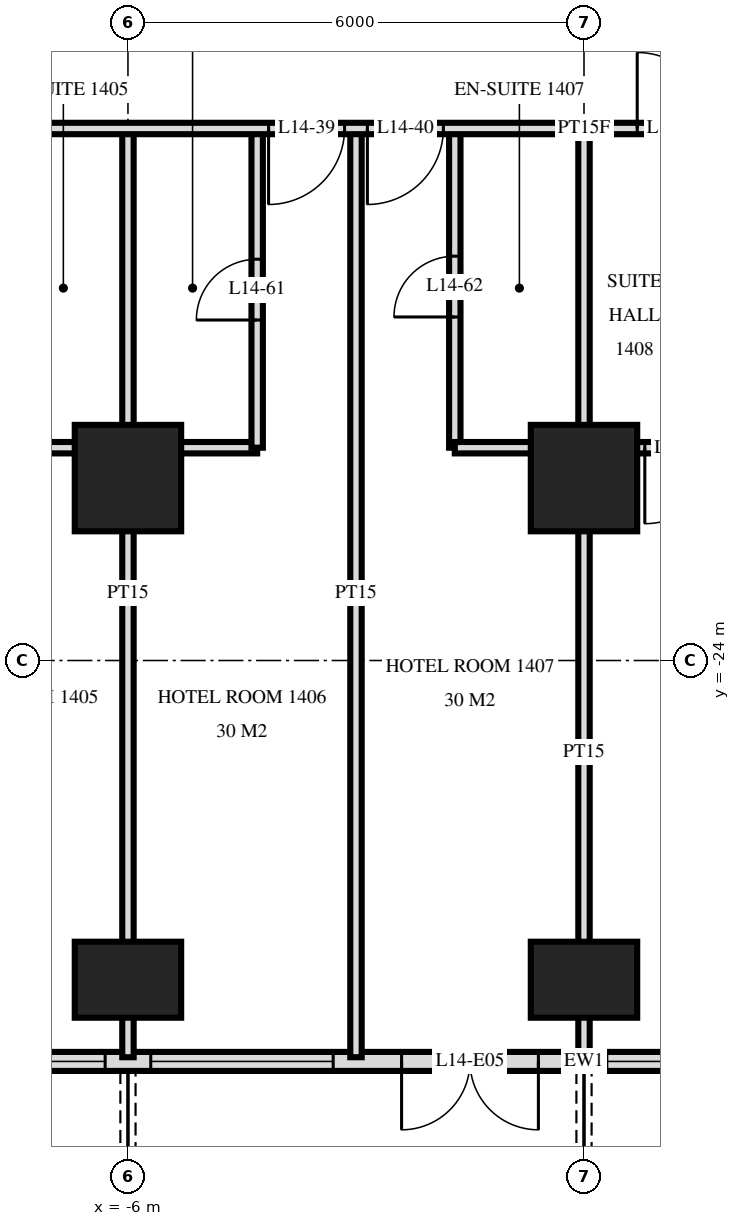
"""IFC4 building model, lengths in metres.
Left out: names, types, materials, properties, quantities, classifications, styles, units other than length and angle.
Written with IfcOpenShell. Run it as: python <this file> out.ifc"""

import sys

from ifc_helpers import new_model, si_unit, direction, frame, frame_2d, origin, origin_2d, place, context, subcontext, project, spatial, rectangle, extrude, element, fill, save


model = new_model("IFC4")
c1 = context("Model", 3, precision=1e-05, world=origin(), true_north=direction((0.0, 1.0)))
c2 = subcontext(c1, "Body", "Model", "MODEL_VIEW")
j1 = project(units=[si_unit("LENGTHUNIT", "METRE"), si_unit("PLANEANGLEUNIT", "RADIAN")], contexts=[c1])
p1 = place(None, origin())
s1 = spatial("IfcSite", under=j1, at=p1, CompositionType="ELEMENT")
p2 = place(p1, origin())
s2 = spatial("IfcBuilding", under=s1, at=p2, CompositionType="ELEMENT")
p3 = place(p2, frame((0.0, 0.0, 60.0)))
s3 = spatial("IfcBuildingStorey", under=s2, at=p3, CompositionType="ELEMENT", Elevation=60.0)
p4 = place(p3, frame((-6.0, -28.2, 0.0), z_axis=(0.0, 0.0, 1.0), x_axis=(1.0, 0.0, 0.0)))
e1 = element("IfcColumn", 1, at=p4, inside=s3, PredefinedType="COLUMN", context=c2, shape_type="SweptSolid", body=[
    extrude(rectangle(XDim=1.4, YDim=1.0, at=origin_2d()), origin(), (0.0, 0.0, 1.0), 3.6),
])
p5 = place(p3, frame((-6.0, -21.6, 0.0), z_axis=(0.0, 0.0, 1.0), x_axis=(1.0, 0.0, 0.0)))
e2 = element("IfcColumn", 2, at=p5, inside=s3, PredefinedType="COLUMN", context=c2, shape_type="SweptSolid", body=[
    extrude(rectangle(XDim=1.4, YDim=1.4, at=origin_2d()), origin(), (0.0, 0.0, 1.0), 3.6),
])
p6 = place(p3, frame((0.0, -28.2, 0.0), z_axis=(0.0, 0.0, 1.0), x_axis=(1.0, 0.0, 0.0)))
e3 = element("IfcColumn", 3, at=p6, inside=s3, PredefinedType="COLUMN", context=c2, shape_type="SweptSolid", body=[
    extrude(rectangle(XDim=1.4, YDim=1.0, at=origin_2d()), origin(), (0.0, 0.0, 1.0), 3.6),
])
p7 = place(p3, frame((0.0, -21.6, 0.0), z_axis=(0.0, 0.0, 1.0), x_axis=(1.0, 0.0, 0.0)))
e4 = element("IfcColumn", 4, at=p7, inside=s3, PredefinedType="COLUMN", context=c2, shape_type="SweptSolid", body=[
    extrude(rectangle(XDim=1.4, YDim=1.4, at=origin_2d()), origin(), (0.0, 0.0, 1.0), 3.6),
])
p8 = place(p3, frame((-28.775, -29.275, 0.0), z_axis=(0.0, 0.0, 1.0), x_axis=(1.0, 0.0, 0.0)))
e5 = element("IfcWall", 5, at=p8, inside=s3, PredefinedType="SOLIDWALL", context=c2, shape_type="SweptSolid", body=[
    extrude(rectangle(XDim=57.551, YDim=0.25, at=frame_2d((28.775, 0.0))), origin(), (0.0, 0.0, 1.0), 3.32),
])
p9 = place(p8, frame((0.575, 0.0, 0.0)))
e6 = element("IfcOpeningElement", 6, at=p9, cuts=e5, PredefinedType="OPENING", context=c2, shape_type="SweptSolid", body=[
    extrude(rectangle(XDim=1.8, YDim=2.4, at=frame_2d((0.9, 1.2))), frame((0.0, 0.135, 0.0), z_axis=(0.0, -1.0, 0.0), x_axis=(1.0, 0.0, 0.0)), (0.0, 0.0, 1.0), 0.27),
])
p10 = place(p8, frame((5.375, 0.0, 0.0)))
e7 = element("IfcOpeningElement", 7, at=p10, cuts=e5, PredefinedType="OPENING", context=c2, shape_type="SweptSolid", body=[
    extrude(rectangle(XDim=1.8, YDim=2.4, at=frame_2d((0.9, 1.2))), frame((0.0, 0.135, 0.0), z_axis=(0.0, -1.0, 0.0), x_axis=(1.0, 0.0, 0.0)), (0.0, 0.0, 1.0), 0.27),
])
p11 = place(p8, frame((8.075, 0.0, 0.3)))
e8 = element("IfcOpeningElement", 8, at=p11, cuts=e5, PredefinedType="OPENING", context=c2, shape_type="SweptSolid", body=[
    extrude(rectangle(XDim=2.4, YDim=2.1, at=frame_2d((1.2, 1.05))), frame((0.0, 0.135, 0.0), z_axis=(0.0, -1.0, 0.0), x_axis=(1.0, 0.0, 0.0)), (0.0, 0.0, 1.0), 0.27),
])
p12 = place(p8, frame((11.375, 0.0, 0.0)))
e9 = element("IfcOpeningElement", 9, at=p12, cuts=e5, PredefinedType="OPENING", context=c2, shape_type="SweptSolid", body=[
    extrude(rectangle(XDim=1.8, YDim=2.4, at=frame_2d((0.9, 1.2))), frame((0.0, 0.135, 0.0), z_axis=(0.0, -1.0, 0.0), x_axis=(1.0, 0.0, 0.0)), (0.0, 0.0, 1.0), 0.27),
])
p13 = place(p8, frame((14.075, 0.0, 0.3)))
e10 = element("IfcOpeningElement", 10, at=p13, cuts=e5, PredefinedType="OPENING", context=c2, shape_type="SweptSolid", body=[
    extrude(rectangle(XDim=2.4, YDim=2.1, at=frame_2d((1.2, 1.05))), frame((0.0, 0.135, 0.0), z_axis=(0.0, -1.0, 0.0), x_axis=(1.0, 0.0, 0.0)), (0.0, 0.0, 1.0), 0.27),
])
p14 = place(p8, frame((17.375, 0.0, 0.0)))
e11 = element("IfcOpeningElement", 11, at=p14, cuts=e5, PredefinedType="OPENING", context=c2, shape_type="SweptSolid", body=[
    extrude(rectangle(XDim=1.8, YDim=2.4, at=frame_2d((0.9, 1.2))), frame((0.0, 0.135, 0.0), z_axis=(0.0, -1.0, 0.0), x_axis=(1.0, 0.0, 0.0)), (0.0, 0.0, 1.0), 0.27),
])
p15 = place(p8, frame((20.075, 0.0, 0.3)))
e12 = element("IfcOpeningElement", 12, at=p15, cuts=e5, PredefinedType="OPENING", context=c2, shape_type="SweptSolid", body=[
    extrude(rectangle(XDim=2.4, YDim=2.1, at=frame_2d((1.2, 1.05))), frame((0.0, 0.135, 0.0), z_axis=(0.0, -1.0, 0.0), x_axis=(1.0, 0.0, 0.0)), (0.0, 0.0, 1.0), 0.27),
])
p16 = place(p8, frame((23.075, 0.0, 0.3)))
e13 = element("IfcOpeningElement", 13, at=p16, cuts=e5, PredefinedType="OPENING", context=c2, shape_type="SweptSolid", body=[
    extrude(rectangle(XDim=2.4, YDim=2.1, at=frame_2d((1.2, 1.05))), frame((0.0, 0.135, 0.0), z_axis=(0.0, -1.0, 0.0), x_axis=(1.0, 0.0, 0.0)), (0.0, 0.0, 1.0), 0.27),
])
p17 = place(p8, frame((26.375, 0.0, 0.0)))
e14 = element("IfcOpeningElement", 14, at=p17, cuts=e5, PredefinedType="OPENING", context=c2, shape_type="SweptSolid", body=[
    extrude(rectangle(XDim=1.8, YDim=2.4, at=frame_2d((0.9, 1.2))), frame((0.0, 0.135, 0.0), z_axis=(0.0, -1.0, 0.0), x_axis=(1.0, 0.0, 0.0)), (0.0, 0.0, 1.0), 0.27),
])
p18 = place(p8, frame((29.075, 0.0, 0.3)))
e15 = element("IfcOpeningElement", 15, at=p18, cuts=e5, PredefinedType="OPENING", context=c2, shape_type="SweptSolid", body=[
    extrude(rectangle(XDim=2.4, YDim=2.1, at=frame_2d((1.2, 1.05))), frame((0.0, 0.135, 0.0), z_axis=(0.0, -1.0, 0.0), x_axis=(1.0, 0.0, 0.0)), (0.0, 0.0, 1.0), 0.27),
])
p19 = place(p8, frame((32.375, 0.0, 0.0)))
e16 = element("IfcOpeningElement", 16, at=p19, cuts=e5, PredefinedType="OPENING", context=c2, shape_type="SweptSolid", body=[
    extrude(rectangle(XDim=1.8, YDim=2.4, at=frame_2d((0.9, 1.2))), frame((0.0, 0.135, 0.0), z_axis=(0.0, -1.0, 0.0), x_axis=(1.0, 0.0, 0.0)), (0.0, 0.0, 1.0), 0.27),
])
p20 = place(p8, frame((35.375, 0.0, 0.0)))
e17 = element("IfcOpeningElement", 17, at=p20, cuts=e5, PredefinedType="OPENING", context=c2, shape_type="SweptSolid", body=[
    extrude(rectangle(XDim=1.8, YDim=2.4, at=frame_2d((0.9, 1.2))), frame((0.0, 0.135, 0.0), z_axis=(0.0, -1.0, 0.0), x_axis=(1.0, 0.0, 0.0)), (0.0, 0.0, 1.0), 0.27),
])
p21 = place(p8, frame((38.075, 0.0, 0.3)))
e18 = element("IfcOpeningElement", 18, at=p21, cuts=e5, PredefinedType="OPENING", context=c2, shape_type="SweptSolid", body=[
    extrude(rectangle(XDim=2.4, YDim=2.1, at=frame_2d((1.2, 1.05))), frame((0.0, 0.135, 0.0), z_axis=(0.0, -1.0, 0.0), x_axis=(1.0, 0.0, 0.0)), (0.0, 0.0, 1.0), 0.27),
])
p22 = place(p8, frame((41.375, 0.0, 0.0)))
e19 = element("IfcOpeningElement", 19, at=p22, cuts=e5, PredefinedType="OPENING", context=c2, shape_type="SweptSolid", body=[
    extrude(rectangle(XDim=1.8, YDim=2.4, at=frame_2d((0.9, 1.2))), frame((0.0, 0.135, 0.0), z_axis=(0.0, -1.0, 0.0), x_axis=(1.0, 0.0, 0.0)), (0.0, 0.0, 1.0), 0.27),
])
p23 = place(p8, frame((44.075, 0.0, 0.3)))
e20 = element("IfcOpeningElement", 20, at=p23, cuts=e5, PredefinedType="OPENING", context=c2, shape_type="SweptSolid", body=[
    extrude(rectangle(XDim=2.4, YDim=2.1, at=frame_2d((1.2, 1.05))), frame((0.0, 0.135, 0.0), z_axis=(0.0, -1.0, 0.0), x_axis=(1.0, 0.0, 0.0)), (0.0, 0.0, 1.0), 0.27),
])
p24 = place(p8, frame((47.075, 0.0, 0.3)))
e21 = element("IfcOpeningElement", 21, at=p24, cuts=e5, PredefinedType="OPENING", context=c2, shape_type="SweptSolid", body=[
    extrude(rectangle(XDim=2.4, YDim=2.1, at=frame_2d((1.2, 1.05))), frame((0.0, 0.135, 0.0), z_axis=(0.0, -1.0, 0.0), x_axis=(1.0, 0.0, 0.0)), (0.0, 0.0, 1.0), 0.27),
])
p25 = place(p8, frame((50.375, 0.0, 0.0)))
e22 = element("IfcOpeningElement", 22, at=p25, cuts=e5, PredefinedType="OPENING", context=c2, shape_type="SweptSolid", body=[
    extrude(rectangle(XDim=1.8, YDim=2.4, at=frame_2d((0.9, 1.2))), frame((0.0, 0.135, 0.0), z_axis=(0.0, -1.0, 0.0), x_axis=(1.0, 0.0, 0.0)), (0.0, 0.0, 1.0), 0.27),
])
p26 = place(p8, frame((53.375, 0.0, 0.0)))
e23 = element("IfcOpeningElement", 23, at=p26, cuts=e5, PredefinedType="OPENING", context=c2, shape_type="SweptSolid", body=[
    extrude(rectangle(XDim=1.8, YDim=2.4, at=frame_2d((0.9, 1.2))), frame((0.0, 0.135, 0.0), z_axis=(0.0, -1.0, 0.0), x_axis=(1.0, 0.0, 0.0)), (0.0, 0.0, 1.0), 0.27),
])
p27 = place(p3, frame((0.0, -21.2, 0.0), z_axis=(0.0, 0.0, 1.0), x_axis=(0.0, 1.0, 0.0)))
e24 = element("IfcWall", 24, at=p27, inside=s3, PredefinedType="PARTITIONING", context=c2, shape_type="SweptSolid", body=[
    extrude(rectangle(XDim=4.2, YDim=0.15, at=frame_2d((2.1, 0.0))), origin(), (0.0, 0.0, 1.0), 3.32),
])
p28 = place(p3, frame((0.0, -29.22, 0.0), z_axis=(0.0, 0.0, 1.0), x_axis=(0.0, 1.0, 0.0)))
e25 = element("IfcWall", 25, at=p28, inside=s3, PredefinedType="PARTITIONING", context=c2, shape_type="SweptSolid", body=[
    extrude(rectangle(XDim=8.02, YDim=0.15, at=frame_2d((4.01, 0.0))), origin(), (0.0, 0.0, 1.0), 3.32),
])
p29 = place(p3, frame((-1.7, -21.2, 0.0), z_axis=(0.0, 0.0, 1.0), x_axis=(0.0, 1.0, 0.0)))
e26 = element("IfcWall", 26, at=p29, inside=s3, PredefinedType="PARTITIONING", context=c2, shape_type="SweptSolid", body=[
    extrude(rectangle(XDim=4.2, YDim=0.15, at=frame_2d((2.1, 0.0))), origin(), (0.0, 0.0, 1.0), 3.32),
])
p30 = place(p29, frame((1.72, 0.0, 0.0)))
e27 = element("IfcOpeningElement", 27, at=p30, cuts=e26, PredefinedType="OPENING", context=c2, shape_type="SweptSolid", body=[
    extrude(rectangle(XDim=0.8, YDim=2.1, at=frame_2d((0.4, 1.05))), frame((0.0, 0.085, 0.0), z_axis=(0.0, -1.0, 0.0), x_axis=(1.0, 0.0, 0.0)), (0.0, 0.0, 1.0), 0.17),
])
p31 = place(p3, frame((-3.0, -29.22, 0.0), z_axis=(0.0, 0.0, 1.0), x_axis=(0.0, 1.0, 0.0)))
e28 = element("IfcWall", 28, at=p31, inside=s3, PredefinedType="PARTITIONING", context=c2, shape_type="SweptSolid", body=[
    extrude(rectangle(XDim=12.22, YDim=0.15, at=frame_2d((6.11, 0.0))), origin(), (0.0, 0.0, 1.0), 3.32),
])
p32 = place(p3, frame((-4.3, -21.2, 0.0), z_axis=(0.0, 0.0, 1.0), x_axis=(0.0, 1.0, 0.0)))
e29 = element("IfcWall", 29, at=p32, inside=s3, PredefinedType="PARTITIONING", context=c2, shape_type="SweptSolid", body=[
    extrude(rectangle(XDim=4.2, YDim=0.15, at=frame_2d((2.1, 0.0))), origin(), (0.0, 0.0, 1.0), 3.32),
])
p33 = place(p32, frame((1.68, 0.0, 0.0)))
e30 = element("IfcOpeningElement", 30, at=p33, cuts=e29, PredefinedType="OPENING", context=c2, shape_type="SweptSolid", body=[
    extrude(rectangle(XDim=0.8, YDim=2.1, at=frame_2d((0.4, 1.05))), frame((0.0, 0.085, 0.0), z_axis=(0.0, -1.0, 0.0), x_axis=(1.0, 0.0, 0.0)), (0.0, 0.0, 1.0), 0.17),
])
p34 = place(p3, frame((-6.0, -29.22, 0.0), z_axis=(0.0, 0.0, 1.0), x_axis=(0.0, 1.0, 0.0)))
e31 = element("IfcWall", 31, at=p34, inside=s3, PredefinedType="PARTITIONING", context=c2, shape_type="SweptSolid", body=[
    extrude(rectangle(XDim=12.22, YDim=0.15, at=frame_2d((6.11, 0.0))), origin(), (0.0, 0.0, 1.0), 3.32),
])
p35 = place(p3, frame((0.0, -21.2, 0.0), z_axis=(0.0, 0.0, 1.0), x_axis=(1.0, 0.0, 0.0)))
e32 = element("IfcWall", 32, at=p35, inside=s3, PredefinedType="PARTITIONING", context=c2, shape_type="SweptSolid", body=[
    extrude(rectangle(XDim=2.4, YDim=0.15, at=frame_2d((1.2, 0.0))), origin(), (0.0, 0.0, 1.0), 3.32),
])
p36 = place(p35, frame((0.8, 0.0, 0.0)))
e33 = element("IfcOpeningElement", 33, at=p36, cuts=e32, PredefinedType="OPENING", context=c2, shape_type="SweptSolid", body=[
    extrude(rectangle(XDim=1.0, YDim=2.1, at=frame_2d((0.5, 1.05))), frame((0.0, 0.085, 0.0), z_axis=(0.0, -1.0, 0.0), x_axis=(1.0, 0.0, 0.0)), (0.0, 0.0, 1.0), 0.17),
])
p37 = place(p3, frame((-7.7, -21.2, 0.0), z_axis=(0.0, 0.0, 1.0), x_axis=(1.0, 0.0, 0.0)))
e34 = element("IfcWall", 34, at=p37, inside=s3, PredefinedType="PARTITIONING", context=c2, shape_type="SweptSolid", body=[
    extrude(rectangle(XDim=3.4, YDim=0.15, at=frame_2d((1.7, 0.0))), origin(), (0.0, 0.0, 1.0), 3.32),
])
p38 = place(p3, frame((-1.7, -21.2, 0.0), z_axis=(0.0, 0.0, 1.0), x_axis=(1.0, 0.0, 0.0)))
e35 = element("IfcWall", 35, at=p38, inside=s3, PredefinedType="PARTITIONING", context=c2, shape_type="SweptSolid", body=[
    extrude(rectangle(XDim=1.7, YDim=0.15, at=frame_2d((0.85, 0.0))), origin(), (0.0, 0.0, 1.0), 3.32),
])
p39 = place(p3, frame((-33.12, -17.0, 0.0), z_axis=(0.0, 0.0, 1.0), x_axis=(1.0, 0.0, 0.0)))
e36 = element("IfcWall", 36, at=p39, inside=s3, PredefinedType="PARTITIONING", context=c2, shape_type="SweptSolid", body=[
    extrude(rectangle(XDim=66.24, YDim=0.15, at=frame_2d((33.12, 0.0))), origin(), (0.0, 0.0, 1.0), 3.32),
])
p40 = place(p39, frame((12.27, 0.0, 0.0)))
e37 = element("IfcOpeningElement", 37, at=p40, cuts=e36, PredefinedType="OPENING", context=c2, shape_type="SweptSolid", body=[
    extrude(rectangle(XDim=1.0, YDim=2.1, at=frame_2d((0.5, 1.05))), frame((0.0, 0.085, 0.0), z_axis=(0.0, -1.0, 0.0), x_axis=(1.0, 0.0, 0.0)), (0.0, 0.0, 1.0), 0.17),
])
p41 = place(p39, frame((16.97, 0.0, 0.0)))
e38 = element("IfcOpeningElement", 38, at=p41, cuts=e36, PredefinedType="OPENING", context=c2, shape_type="SweptSolid", body=[
    extrude(rectangle(XDim=1.0, YDim=2.1, at=frame_2d((0.5, 1.05))), frame((0.0, 0.085, 0.0), z_axis=(0.0, -1.0, 0.0), x_axis=(1.0, 0.0, 0.0)), (0.0, 0.0, 1.0), 0.17),
])
p42 = place(p39, frame((18.27, 0.0, 0.0)))
e39 = element("IfcOpeningElement", 39, at=p42, cuts=e36, PredefinedType="OPENING", context=c2, shape_type="SweptSolid", body=[
    extrude(rectangle(XDim=1.0, YDim=2.1, at=frame_2d((0.5, 1.05))), frame((0.0, 0.085, 0.0), z_axis=(0.0, -1.0, 0.0), x_axis=(1.0, 0.0, 0.0)), (0.0, 0.0, 1.0), 0.17),
])
p43 = place(p39, frame((22.97, 0.0, 0.0)))
e40 = element("IfcOpeningElement", 40, at=p43, cuts=e36, PredefinedType="OPENING", context=c2, shape_type="SweptSolid", body=[
    extrude(rectangle(XDim=1.0, YDim=2.1, at=frame_2d((0.5, 1.05))), frame((0.0, 0.085, 0.0), z_axis=(0.0, -1.0, 0.0), x_axis=(1.0, 0.0, 0.0)), (0.0, 0.0, 1.0), 0.17),
])
p44 = place(p39, frame((24.27, 0.0, 0.0)))
e41 = element("IfcOpeningElement", 41, at=p44, cuts=e36, PredefinedType="OPENING", context=c2, shape_type="SweptSolid", body=[
    extrude(rectangle(XDim=1.0, YDim=2.1, at=frame_2d((0.5, 1.05))), frame((0.0, 0.085, 0.0), z_axis=(0.0, -1.0, 0.0), x_axis=(1.0, 0.0, 0.0)), (0.0, 0.0, 1.0), 0.17),
])
p45 = place(p39, frame((28.97, 0.0, 0.0)))
e42 = element("IfcOpeningElement", 42, at=p45, cuts=e36, PredefinedType="OPENING", context=c2, shape_type="SweptSolid", body=[
    extrude(rectangle(XDim=1.0, YDim=2.1, at=frame_2d((0.5, 1.05))), frame((0.0, 0.085, 0.0), z_axis=(0.0, -1.0, 0.0), x_axis=(1.0, 0.0, 0.0)), (0.0, 0.0, 1.0), 0.17),
])
p46 = place(p39, frame((30.27, 0.0, 0.0)))
e43 = element("IfcOpeningElement", 43, at=p46, cuts=e36, PredefinedType="OPENING", context=c2, shape_type="SweptSolid", body=[
    extrude(rectangle(XDim=1.0, YDim=2.1, at=frame_2d((0.5, 1.05))), frame((0.0, 0.085, 0.0), z_axis=(0.0, -1.0, 0.0), x_axis=(1.0, 0.0, 0.0)), (0.0, 0.0, 1.0), 0.17),
])
p47 = place(p39, frame((33.82, 0.0, 0.0)))
e44 = element("IfcOpeningElement", 44, at=p47, cuts=e36, PredefinedType="OPENING", context=c2, shape_type="SweptSolid", body=[
    extrude(rectangle(XDim=1.0, YDim=2.1, at=frame_2d((0.5, 1.05))), frame((0.0, 0.085, 0.0), z_axis=(0.0, -1.0, 0.0), x_axis=(1.0, 0.0, 0.0)), (0.0, 0.0, 1.0), 0.17),
])
p48 = place(p39, frame((46.27, 0.0, 0.0)))
e45 = element("IfcOpeningElement", 45, at=p48, cuts=e36, PredefinedType="OPENING", context=c2, shape_type="SweptSolid", body=[
    extrude(rectangle(XDim=1.0, YDim=2.1, at=frame_2d((0.5, 1.05))), frame((0.0, 0.085, 0.0), z_axis=(0.0, -1.0, 0.0), x_axis=(1.0, 0.0, 0.0)), (0.0, 0.0, 1.0), 0.17),
])
p49 = place(p39, frame((52.97, 0.0, 0.0)))
e46 = element("IfcOpeningElement", 46, at=p49, cuts=e36, PredefinedType="OPENING", context=c2, shape_type="SweptSolid", body=[
    extrude(rectangle(XDim=1.0, YDim=2.1, at=frame_2d((0.5, 1.05))), frame((0.0, 0.085, 0.0), z_axis=(0.0, -1.0, 0.0), x_axis=(1.0, 0.0, 0.0)), (0.0, 0.0, 1.0), 0.17),
])
p50 = place(p39, frame((6.05, 0.0, 0.0)))
e47 = element("IfcOpeningElement", 47, at=p50, cuts=e36, PredefinedType="OPENING", context=c2, shape_type="SweptSolid", body=[
    extrude(rectangle(XDim=1.0, YDim=2.1, at=frame_2d((0.5, 1.05))), frame((0.0, 0.085, 0.0), z_axis=(0.0, -1.0, 0.0), x_axis=(1.0, 0.0, 0.0)), (0.0, 0.0, 1.0), 0.17),
])
p51 = place(p39, frame((59.15, 0.0, 0.0)))
e48 = element("IfcOpeningElement", 48, at=p51, cuts=e36, PredefinedType="OPENING", context=c2, shape_type="SweptSolid", body=[
    extrude(rectangle(XDim=1.0, YDim=2.1, at=frame_2d((0.5, 1.05))), frame((0.0, 0.085, 0.0), z_axis=(0.0, -1.0, 0.0), x_axis=(1.0, 0.0, 0.0)), (0.0, 0.0, 1.0), 0.17),
])
p52 = place(p15, origin())
e49 = element("IfcWindow", 49, at=p52, inside=s3, PartitioningType="SINGLE_PANEL", PredefinedType="WINDOW", context=c2, shape_type="SweptSolid", body=[
    extrude(rectangle(XDim=2.4, YDim=2.1, at=frame_2d((1.2, 1.05))), frame((0.0, 0.03, 0.0), z_axis=(0.0, -1.0, 0.0), x_axis=(1.0, 0.0, 0.0)), (0.0, 0.0, 1.0), 0.06),
])
fill(e12, e49)
p53 = place(p16, origin())
e50 = element("IfcWindow", 50, at=p53, inside=s3, PartitioningType="SINGLE_PANEL", PredefinedType="WINDOW", context=c2, shape_type="SweptSolid", body=[
    extrude(rectangle(XDim=2.4, YDim=2.1, at=frame_2d((1.2, 1.05))), frame((0.0, 0.03, 0.0), z_axis=(0.0, -1.0, 0.0), x_axis=(1.0, 0.0, 0.0)), (0.0, 0.0, 1.0), 0.06),
])
fill(e13, e50)
p54 = place(p17, frame((0.9, 0.0, 0.0), z_axis=(0.0, 0.0, 1.0), x_axis=(-1.0, 0.0, 0.0)))
e51 = element("IfcDoor", 51, at=p54, inside=s3, OperationType="DOUBLE_DOOR_SINGLE_SWING", PredefinedType="DOOR", context=c2, shape_type="SweptSolid", body=[
    extrude(rectangle(XDim=1.8, YDim=2.4, at=frame_2d((0.0, 1.2))), frame((0.0, -0.025, 0.0), z_axis=(0.0, 1.0, 0.0), x_axis=(-1.0, 0.0, 0.0)), (0.0, 0.0, 1.0), 0.05),
])
fill(e14, e51)
p55 = place(p18, origin())
e52 = element("IfcWindow", 52, at=p55, inside=s3, PartitioningType="SINGLE_PANEL", PredefinedType="WINDOW", context=c2, shape_type="SweptSolid", body=[
    extrude(rectangle(XDim=2.4, YDim=2.1, at=frame_2d((1.2, 1.05))), frame((0.0, 0.03, 0.0), z_axis=(0.0, -1.0, 0.0), x_axis=(1.0, 0.0, 0.0)), (0.0, 0.0, 1.0), 0.06),
])
fill(e15, e52)
p56 = place(p45, frame((0.5, 0.0, 0.0), z_axis=(0.0, 0.0, 1.0), x_axis=(-1.0, 0.0, 0.0)))
e53 = element("IfcDoor", 53, at=p56, inside=s3, OperationType="SINGLE_SWING_LEFT", PredefinedType="DOOR", context=c2, shape_type="SweptSolid", body=[
    extrude(rectangle(XDim=1.0, YDim=2.1, at=frame_2d((0.0, 1.05))), frame((0.0, -0.025, 0.0), z_axis=(0.0, 1.0, 0.0), x_axis=(-1.0, 0.0, 0.0)), (0.0, 0.0, 1.0), 0.05),
])
fill(e42, e53)
p57 = place(p46, frame((0.5, 0.0, 0.0), z_axis=(0.0, 0.0, 1.0), x_axis=(-1.0, 0.0, 0.0)))
e54 = element("IfcDoor", 54, at=p57, inside=s3, OperationType="SINGLE_SWING_LEFT", PredefinedType="DOOR", context=c2, shape_type="SweptSolid", body=[
    extrude(rectangle(XDim=1.0, YDim=2.1, at=frame_2d((0.0, 1.05))), frame((0.0, -0.025, 0.0), z_axis=(0.0, 1.0, 0.0), x_axis=(-1.0, 0.0, 0.0)), (0.0, 0.0, 1.0), 0.05),
])
fill(e43, e54)
p58 = place(p47, origin())
e55 = element("IfcDoor", 55, at=p58, inside=s3, OperationType="SINGLE_SWING_RIGHT", PredefinedType="DOOR", context=c2, shape_type="SweptSolid", body=[
    extrude(rectangle(XDim=1.0, YDim=2.1, at=frame_2d((0.5, 1.05))), frame((0.0, 0.025, 0.0), z_axis=(0.0, -1.0, 0.0), x_axis=(1.0, 0.0, 0.0)), (0.0, 0.0, 1.0), 0.05),
])
fill(e44, e55)
p59 = place(p33, origin())
e56 = element("IfcDoor", 56, at=p59, inside=s3, OperationType="SINGLE_SWING_RIGHT", PredefinedType="DOOR", context=c2, shape_type="SweptSolid", body=[
    extrude(rectangle(XDim=0.8, YDim=2.1, at=frame_2d((0.4, 1.05))), frame((0.0, 0.025, 0.0), z_axis=(0.0, -1.0, 0.0), x_axis=(1.0, 0.0, 0.0)), (0.0, 0.0, 1.0), 0.05),
])
fill(e30, e56)
p60 = place(p30, origin())
e57 = element("IfcDoor", 57, at=p60, inside=s3, OperationType="SINGLE_SWING_RIGHT", PredefinedType="DOOR", context=c2, shape_type="SweptSolid", body=[
    extrude(rectangle(XDim=0.8, YDim=2.1, at=frame_2d((0.4, 1.05))), frame((0.0, 0.025, 0.0), z_axis=(0.0, -1.0, 0.0), x_axis=(1.0, 0.0, 0.0)), (0.0, 0.0, 1.0), 0.05),
])
fill(e27, e57)
p61 = place(p36, frame((0.5, 0.0, 0.0), z_axis=(0.0, 0.0, 1.0), x_axis=(-1.0, 0.0, 0.0)))
e58 = element("IfcDoor", 58, at=p61, inside=s3, OperationType="SINGLE_SWING_LEFT", PredefinedType="DOOR", context=c2, shape_type="SweptSolid", body=[
    extrude(rectangle(XDim=1.0, YDim=2.1, at=frame_2d((0.0, 1.05))), frame((0.0, -0.025, 0.0), z_axis=(0.0, 1.0, 0.0), x_axis=(-1.0, 0.0, 0.0)), (0.0, 0.0, 1.0), 0.05),
])
fill(e33, e58)
save(model, sys.argv[1])
